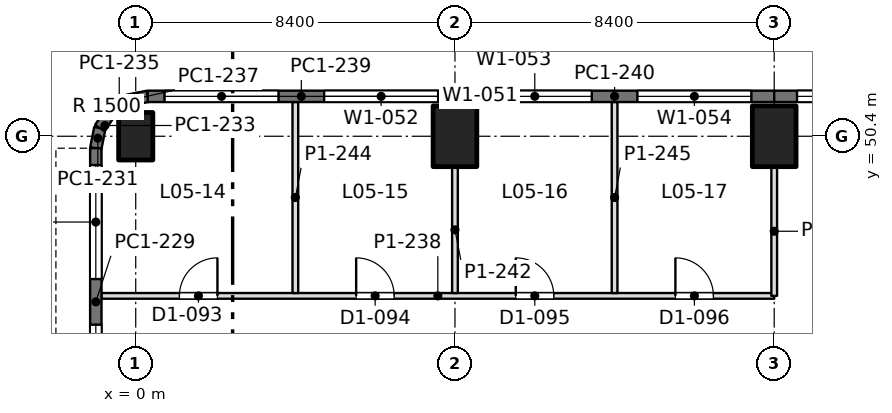
"""IFC4 building model, lengths in metres.
Left out: names, types, materials, properties, quantities, classifications, styles, units other than length and angle.
Written with IfcOpenShell. Run it as: python <this file> out.ifc"""

import sys

from ifc_helpers import new_model, si_unit, direction, frame, frame_2d, origin, origin_2d, place, context, subcontext, project, spatial, rectangle, extrude, element, fill, save


model = new_model("IFC4")
c1 = context("Model", 3, precision=1e-05, world=origin(), true_north=direction((0.0, 1.0)))
c2 = subcontext(c1, "Body", "Model", "MODEL_VIEW")
j1 = project(units=[si_unit("LENGTHUNIT", "METRE"), si_unit("PLANEANGLEUNIT", "RADIAN")], contexts=[c1])
p1 = place(None, origin())
s1 = spatial("IfcSite", under=j1, at=p1, CompositionType="ELEMENT")
p2 = place(p1, origin())
s2 = spatial("IfcBuilding", under=s1, at=p2, CompositionType="ELEMENT")
p3 = place(p2, frame((0.0, 0.0, 23.4)))
s3 = spatial("IfcBuildingStorey", under=s2, at=p3, CompositionType="ELEMENT", Elevation=23.4)
p4 = place(p3, frame((0.0, 50.4, 0.0), z_axis=(0.0, 0.0, 1.0), x_axis=(1.0, 0.0, 0.0)))
e1 = element("IfcColumn", 1, at=p4, inside=s3, PredefinedType="COLUMN", context=c2, shape_type="SweptSolid", body=[
    extrude(rectangle(XDim=0.9, YDim=1.25, at=origin_2d()), origin(), (0.0, 0.0, 1.0), 4.5),
])
for number, where, z_axis, x_axis in (
    (2, (8.4, 50.4, 0.0), (0.0, 0.0, 1.0), (1.0, 0.0, 0.0)),
    (3, (16.8, 50.4, 0.0), (0.0, 0.0, 1.0), (1.0, 0.0, 0.0)),
):
    element("IfcColumn", number, at=place(p3, frame(where, z_axis=z_axis, x_axis=x_axis)), inside=s3, PredefinedType="COLUMN", context=c2, shape_type="SweptSolid", body=[
        extrude(rectangle(XDim=1.15, YDim=1.6, at=origin_2d()), origin(), (0.0, 0.0, 1.0), 4.5),
    ])
p5 = place(p3, frame((-1.05, 42.0, 0.0), z_axis=(0.0, 0.0, 1.0), x_axis=(0.0, 1.0, 0.0)))
e4 = element("IfcWall", 4, at=p5, inside=s3, PredefinedType="SOLIDWALL", context=c2, shape_type="SweptSolid", body=[
    extrude(rectangle(XDim=8.085, YDim=0.3, at=frame_2d((4.042, 0.0))), origin(), (0.0, 0.0, 1.0), 4.34),
])
p6 = place(p5, frame((0.443, 0.0, 0.9)))
e5 = element("IfcOpeningElement", 5, at=p6, cuts=e4, PredefinedType="OPENING", context=c2, shape_type="SweptSolid", body=[
    extrude(rectangle(XDim=3.0, YDim=1.9, at=frame_2d((1.5, 0.95))), frame((0.0, 0.16, 0.0), z_axis=(0.0, -1.0, 0.0), x_axis=(1.0, 0.0, 0.0)), (0.0, 0.0, 1.0), 0.32),
])
p7 = place(p5, frame((4.643, 0.0, 0.9)))
e6 = element("IfcOpeningElement", 6, at=p7, cuts=e4, PredefinedType="OPENING", context=c2, shape_type="SweptSolid", body=[
    extrude(rectangle(XDim=3.0, YDim=1.9, at=frame_2d((1.5, 0.95))), frame((0.0, 0.16, 0.0), z_axis=(0.0, -1.0, 0.0), x_axis=(1.0, 0.0, 0.0)), (0.0, 0.0, 1.0), 0.32),
])
p8 = place(p3, frame((-1.05, 50.085, 0.0), z_axis=(0.0, 0.0, 1.0), x_axis=(0.195073962632, 0.980788534345, 0.0)))
e7 = element("IfcWall", 7, at=p8, inside=s3, PredefinedType="SOLIDWALL", context=c2, shape_type="SweptSolid", body=[
    extrude(rectangle(XDim=0.541, YDim=0.3, at=frame_2d((0.271, 0.0))), origin(), (0.0, 0.0, 1.0), 4.34),
])
for number, where, z_axis, x_axis in (
    (8, (-0.945, 50.615, 0.0), (0.0, 0.0, 1.0), (0.556, 0.831, 0.0)),
    (9, (-0.653, 51.052, 0.0), (0.0, 0.0, 1.0), (0.831, 0.556, 0.0)),
):
    element("IfcWall", number, at=place(p3, frame(where, z_axis=z_axis, x_axis=x_axis)), inside=s3, PredefinedType="SOLIDWALL", context=c2, shape_type="SweptSolid", body=[
        extrude(rectangle(XDim=0.526, YDim=0.3, at=frame_2d((0.263, 0.0))), origin(), (0.0, 0.0, 1.0), 4.34),
    ])
p9 = place(p3, frame((-0.216, 51.344, 0.0), z_axis=(0.0, 0.0, 1.0), x_axis=(0.980788534345, 0.195073962632, 0.0)))
e10 = element("IfcWall", 10, at=p9, inside=s3, PredefinedType="SOLIDWALL", context=c2, shape_type="SweptSolid", body=[
    extrude(rectangle(XDim=0.541, YDim=0.3, at=frame_2d((0.271, 0.0))), origin(), (0.0, 0.0, 1.0), 4.34),
])
p10 = place(p3, frame((0.315, 51.45, 0.0), z_axis=(0.0, 0.0, 1.0), x_axis=(1.0, 0.0, 0.0)))
e11 = element("IfcWall", 11, at=p10, inside=s3, PredefinedType="SOLIDWALL", context=c2, shape_type="SweptSolid", body=[
    extrude(rectangle(XDim=8.085, YDim=0.3, at=frame_2d((4.042, 0.0))), origin(), (0.0, 0.0, 1.0), 4.34),
])
p11 = place(p10, frame((0.443, 0.0, 0.9)))
e12 = element("IfcOpeningElement", 12, at=p11, cuts=e11, PredefinedType="OPENING", context=c2, shape_type="SweptSolid", body=[
    extrude(rectangle(XDim=3.0, YDim=1.9, at=frame_2d((1.5, 0.95))), frame((0.0, 0.16, 0.0), z_axis=(0.0, -1.0, 0.0), x_axis=(1.0, 0.0, 0.0)), (0.0, 0.0, 1.0), 0.32),
])
p12 = place(p10, frame((4.643, 0.0, 0.9)))
e13 = element("IfcOpeningElement", 13, at=p12, cuts=e11, PredefinedType="OPENING", context=c2, shape_type="SweptSolid", body=[
    extrude(rectangle(XDim=3.0, YDim=1.9, at=frame_2d((1.5, 0.95))), frame((0.0, 0.16, 0.0), z_axis=(0.0, -1.0, 0.0), x_axis=(1.0, 0.0, 0.0)), (0.0, 0.0, 1.0), 0.32),
])
p13 = place(p3, frame((8.4, 51.45, 0.0), z_axis=(0.0, 0.0, 1.0), x_axis=(1.0, 0.0, 0.0)))
e14 = element("IfcWall", 14, at=p13, inside=s3, PredefinedType="SOLIDWALL", context=c2, shape_type="SweptSolid", body=[
    extrude(rectangle(XDim=8.4, YDim=0.3, at=frame_2d((4.2, 0.0))), origin(), (0.0, 0.0, 1.0), 4.34),
])
p14 = place(p13, frame((0.6, 0.0, 0.9)))
e15 = element("IfcOpeningElement", 15, at=p14, cuts=e14, PredefinedType="OPENING", context=c2, shape_type="SweptSolid", body=[
    extrude(rectangle(XDim=3.0, YDim=1.9, at=frame_2d((1.5, 0.95))), frame((0.0, 0.16, 0.0), z_axis=(0.0, -1.0, 0.0), x_axis=(1.0, 0.0, 0.0)), (0.0, 0.0, 1.0), 0.32),
])
p15 = place(p13, frame((4.8, 0.0, 0.9)))
e16 = element("IfcOpeningElement", 16, at=p15, cuts=e14, PredefinedType="OPENING", context=c2, shape_type="SweptSolid", body=[
    extrude(rectangle(XDim=3.0, YDim=1.9, at=frame_2d((1.5, 0.95))), frame((0.0, 0.16, 0.0), z_axis=(0.0, -1.0, 0.0), x_axis=(1.0, 0.0, 0.0)), (0.0, 0.0, 1.0), 0.32),
])
p16 = place(p3, frame((16.8, 51.45, 0.0), z_axis=(0.0, 0.0, 1.0), x_axis=(1.0, 0.0, 0.0)))
e17 = element("IfcWall", 17, at=p16, inside=s3, PredefinedType="SOLIDWALL", context=c2, shape_type="SweptSolid", body=[
    extrude(rectangle(XDim=8.4, YDim=0.3, at=frame_2d((4.2, 0.0))), origin(), (0.0, 0.0, 1.0), 4.34),
])
p17 = place(p16, frame((0.6, 0.0, 0.9)))
e18 = element("IfcOpeningElement", 18, at=p17, cuts=e17, PredefinedType="OPENING", context=c2, shape_type="SweptSolid", body=[
    extrude(rectangle(XDim=3.0, YDim=1.9, at=frame_2d((1.5, 0.95))), frame((0.0, 0.16, 0.0), z_axis=(0.0, -1.0, 0.0), x_axis=(1.0, 0.0, 0.0)), (0.0, 0.0, 1.0), 0.32),
])
p18 = place(p16, frame((4.8, 0.0, 0.9)))
e19 = element("IfcOpeningElement", 19, at=p18, cuts=e17, PredefinedType="OPENING", context=c2, shape_type="SweptSolid", body=[
    extrude(rectangle(XDim=3.0, YDim=1.9, at=frame_2d((1.5, 0.95))), frame((0.0, 0.16, 0.0), z_axis=(0.0, -1.0, 0.0), x_axis=(1.0, 0.0, 0.0)), (0.0, 0.0, 1.0), 0.32),
])
p19 = place(p3, frame((-0.902, 46.2, 0.0), z_axis=(0.0, 0.0, 1.0), x_axis=(1.0, 0.0, 0.0)))
e20 = element("IfcWall", 20, at=p19, inside=s3, PredefinedType="PARTITIONING", context=c2, shape_type="SweptSolid", body=[
    extrude(rectangle(XDim=17.702, YDim=0.15, at=frame_2d((8.851, 0.0))), origin(), (0.0, 0.0, 1.0), 3.74),
])
p20 = place(p19, frame((2.052, 0.0, 0.0)))
e21 = element("IfcOpeningElement", 21, at=p20, cuts=e20, PredefinedType="OPENING", context=c2, shape_type="SweptSolid", body=[
    extrude(rectangle(XDim=1.0, YDim=2.2, at=frame_2d((0.5, 1.1))), frame((0.0, 0.085, 0.0), z_axis=(0.0, -1.0, 0.0), x_axis=(1.0, 0.0, 0.0)), (0.0, 0.0, 1.0), 0.17),
])
p21 = place(p19, frame((6.702, 0.0, 0.0)))
e22 = element("IfcOpeningElement", 22, at=p21, cuts=e20, PredefinedType="OPENING", context=c2, shape_type="SweptSolid", body=[
    extrude(rectangle(XDim=1.0, YDim=2.2, at=frame_2d((0.5, 1.1))), frame((0.0, 0.085, 0.0), z_axis=(0.0, -1.0, 0.0), x_axis=(1.0, 0.0, 0.0)), (0.0, 0.0, 1.0), 0.17),
])
p22 = place(p19, frame((10.902, 0.0, 0.0)))
e23 = element("IfcOpeningElement", 23, at=p22, cuts=e20, PredefinedType="OPENING", context=c2, shape_type="SweptSolid", body=[
    extrude(rectangle(XDim=1.0, YDim=2.2, at=frame_2d((0.5, 1.1))), frame((0.0, 0.085, 0.0), z_axis=(0.0, -1.0, 0.0), x_axis=(1.0, 0.0, 0.0)), (0.0, 0.0, 1.0), 0.17),
])
p23 = place(p19, frame((15.102, 0.0, 0.0)))
e24 = element("IfcOpeningElement", 24, at=p23, cuts=e20, PredefinedType="OPENING", context=c2, shape_type="SweptSolid", body=[
    extrude(rectangle(XDim=1.0, YDim=2.2, at=frame_2d((0.5, 1.1))), frame((0.0, 0.085, 0.0), z_axis=(0.0, -1.0, 0.0), x_axis=(1.0, 0.0, 0.0)), (0.0, 0.0, 1.0), 0.17),
])
p24 = place(p3, frame((4.2, 46.274, 0.0), z_axis=(0.0, 0.0, 1.0), x_axis=(0.0, 1.0, 0.0)))
e25 = element("IfcWall", 25, at=p24, inside=s3, PredefinedType="PARTITIONING", context=c2, shape_type="SweptSolid", body=[
    extrude(rectangle(XDim=5.028, YDim=0.15, at=frame_2d((2.514, 0.0))), origin(), (0.0, 0.0, 1.0), 3.84),
])
p25 = place(p3, frame((8.4, 46.274, 0.0), z_axis=(0.0, 0.0, 1.0), x_axis=(0.0, 1.0, 0.0)))
e26 = element("IfcWall", 26, at=p25, inside=s3, PredefinedType="PARTITIONING", context=c2, shape_type="SweptSolid", body=[
    extrude(rectangle(XDim=3.327, YDim=0.15, at=frame_2d((1.664, 0.0))), origin(), (0.0, 0.0, 1.0), 3.74),
])
p26 = place(p3, frame((12.6, 46.274, 0.0), z_axis=(0.0, 0.0, 1.0), x_axis=(0.0, 1.0, 0.0)))
e27 = element("IfcWall", 27, at=p26, inside=s3, PredefinedType="PARTITIONING", context=c2, shape_type="SweptSolid", body=[
    extrude(rectangle(XDim=5.028, YDim=0.15, at=frame_2d((2.514, 0.0))), origin(), (0.0, 0.0, 1.0), 3.84),
])
p27 = place(p3, frame((16.8, 46.2, 0.0), z_axis=(0.0, 0.0, 1.0), x_axis=(0.0, 1.0, 0.0)))
e28 = element("IfcWall", 28, at=p27, inside=s3, PredefinedType="PARTITIONING", context=c2, shape_type="SweptSolid", body=[
    extrude(rectangle(XDim=3.401, YDim=0.15, at=frame_2d((1.701, 0.0))), origin(), (0.0, 0.0, 1.0), 3.74),
])
p28 = place(p6, origin())
e29 = element("IfcWindow", 29, at=p28, inside=s3, PartitioningType="SINGLE_PANEL", PredefinedType="WINDOW", context=c2, shape_type="SweptSolid", body=[
    extrude(rectangle(XDim=3.0, YDim=1.9, at=frame_2d((1.5, 0.95))), frame((0.0, 0.03, 0.0), z_axis=(0.0, -1.0, 0.0), x_axis=(1.0, 0.0, 0.0)), (0.0, 0.0, 1.0), 0.06),
])
fill(e5, e29)
p29 = place(p7, origin())
e30 = element("IfcWindow", 30, at=p29, inside=s3, PartitioningType="SINGLE_PANEL", PredefinedType="WINDOW", context=c2, shape_type="SweptSolid", body=[
    extrude(rectangle(XDim=3.0, YDim=1.9, at=frame_2d((1.5, 0.95))), frame((0.0, 0.03, 0.0), z_axis=(0.0, -1.0, 0.0), x_axis=(1.0, 0.0, 0.0)), (0.0, 0.0, 1.0), 0.06),
])
fill(e6, e30)
p30 = place(p11, origin())
e31 = element("IfcWindow", 31, at=p30, inside=s3, PartitioningType="SINGLE_PANEL", PredefinedType="WINDOW", context=c2, shape_type="SweptSolid", body=[
    extrude(rectangle(XDim=3.0, YDim=1.9, at=frame_2d((1.5, 0.95))), frame((0.0, 0.03, 0.0), z_axis=(0.0, -1.0, 0.0), x_axis=(1.0, 0.0, 0.0)), (0.0, 0.0, 1.0), 0.06),
])
fill(e12, e31)
p31 = place(p12, origin())
e32 = element("IfcWindow", 32, at=p31, inside=s3, PartitioningType="SINGLE_PANEL", PredefinedType="WINDOW", context=c2, shape_type="SweptSolid", body=[
    extrude(rectangle(XDim=3.0, YDim=1.9, at=frame_2d((1.5, 0.95))), frame((0.0, 0.03, 0.0), z_axis=(0.0, -1.0, 0.0), x_axis=(1.0, 0.0, 0.0)), (0.0, 0.0, 1.0), 0.06),
])
fill(e13, e32)
p32 = place(p14, origin())
e33 = element("IfcWindow", 33, at=p32, inside=s3, PartitioningType="SINGLE_PANEL", PredefinedType="WINDOW", context=c2, shape_type="SweptSolid", body=[
    extrude(rectangle(XDim=3.0, YDim=1.9, at=frame_2d((1.5, 0.95))), frame((0.0, 0.03, 0.0), z_axis=(0.0, -1.0, 0.0), x_axis=(1.0, 0.0, 0.0)), (0.0, 0.0, 1.0), 0.06),
])
fill(e15, e33)
p33 = place(p15, origin())
e34 = element("IfcWindow", 34, at=p33, inside=s3, PartitioningType="SINGLE_PANEL", PredefinedType="WINDOW", context=c2, shape_type="SweptSolid", body=[
    extrude(rectangle(XDim=3.0, YDim=1.9, at=frame_2d((1.5, 0.95))), frame((0.0, 0.03, 0.0), z_axis=(0.0, -1.0, 0.0), x_axis=(1.0, 0.0, 0.0)), (0.0, 0.0, 1.0), 0.06),
])
fill(e16, e34)
p34 = place(p17, origin())
e35 = element("IfcWindow", 35, at=p34, inside=s3, PartitioningType="SINGLE_PANEL", PredefinedType="WINDOW", context=c2, shape_type="SweptSolid", body=[
    extrude(rectangle(XDim=3.0, YDim=1.9, at=frame_2d((1.5, 0.95))), frame((0.0, 0.03, 0.0), z_axis=(0.0, -1.0, 0.0), x_axis=(1.0, 0.0, 0.0)), (0.0, 0.0, 1.0), 0.06),
])
fill(e18, e35)
p35 = place(p20, origin())
e36 = element("IfcDoor", 36, at=p35, inside=s3, OperationType="SINGLE_SWING_RIGHT", PredefinedType="DOOR", context=c2, shape_type="SweptSolid", body=[
    extrude(rectangle(XDim=1.0, YDim=2.2, at=frame_2d((0.5, 1.1))), frame((0.0, 0.025, 0.0), z_axis=(0.0, -1.0, 0.0), x_axis=(1.0, 0.0, 0.0)), (0.0, 0.0, 1.0), 0.05),
])
fill(e21, e36)
p36 = place(p21, origin())
e37 = element("IfcDoor", 37, at=p36, inside=s3, OperationType="SINGLE_SWING_LEFT", PredefinedType="DOOR", context=c2, shape_type="SweptSolid", body=[
    extrude(rectangle(XDim=1.0, YDim=2.2, at=frame_2d((0.5, 1.1))), frame((0.0, 0.025, 0.0), z_axis=(0.0, -1.0, 0.0), x_axis=(1.0, 0.0, 0.0)), (0.0, 0.0, 1.0), 0.05),
])
fill(e22, e37)
p37 = place(p22, origin())
e38 = element("IfcDoor", 38, at=p37, inside=s3, OperationType="SINGLE_SWING_LEFT", PredefinedType="DOOR", context=c2, shape_type="SweptSolid", body=[
    extrude(rectangle(XDim=1.0, YDim=2.2, at=frame_2d((0.5, 1.1))), frame((0.0, 0.025, 0.0), z_axis=(0.0, -1.0, 0.0), x_axis=(1.0, 0.0, 0.0)), (0.0, 0.0, 1.0), 0.05),
])
fill(e23, e38)
p38 = place(p23, origin())
e39 = element("IfcDoor", 39, at=p38, inside=s3, OperationType="SINGLE_SWING_LEFT", PredefinedType="DOOR", context=c2, shape_type="SweptSolid", body=[
    extrude(rectangle(XDim=1.0, YDim=2.2, at=frame_2d((0.5, 1.1))), frame((0.0, 0.025, 0.0), z_axis=(0.0, -1.0, 0.0), x_axis=(1.0, 0.0, 0.0)), (0.0, 0.0, 1.0), 0.05),
])
fill(e24, e39)
save(model, sys.argv[1])
